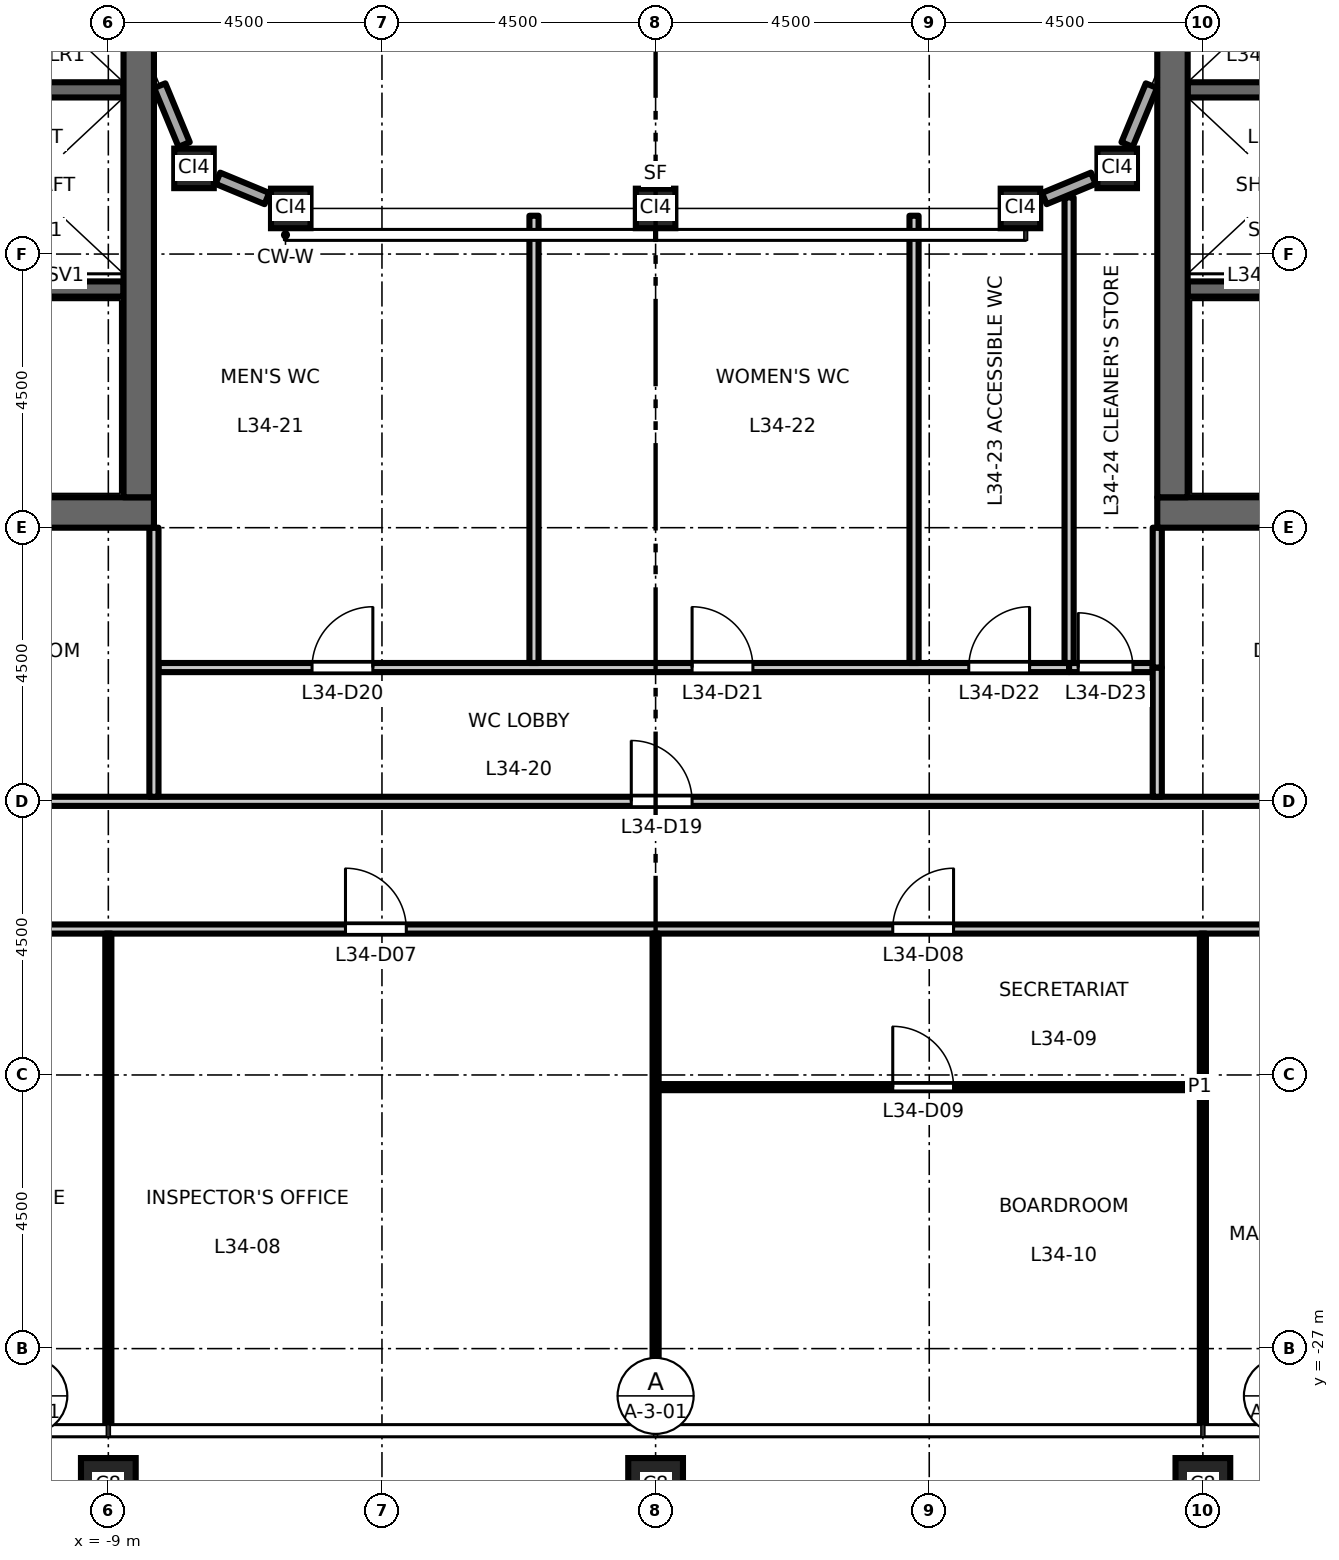
"""IFC4 building model, lengths in metres.
Left out: names, types, materials, properties, quantities, classifications, styles, units other than length and angle.
Written with IfcOpenShell. Run it as: python <this file> out.ifc"""

import sys

from ifc_helpers import new_model, si_unit, direction, frame, frame_2d, origin, origin_2d, place, context, subcontext, project, spatial, rectangle, hollow_rectangle, extrude, element, fill, save


model = new_model("IFC4")
c1 = context("Model", 3, precision=1e-05, world=origin(), true_north=direction((0.0, 1.0)))
c2 = subcontext(c1, "Body", "Model", "MODEL_VIEW")
j1 = project(units=[si_unit("LENGTHUNIT", "METRE"), si_unit("PLANEANGLEUNIT", "RADIAN")], contexts=[c1])
p1 = place(None, origin())
s1 = spatial("IfcSite", under=j1, at=p1, CompositionType="ELEMENT")
p2 = place(p1, origin())
s2 = spatial("IfcBuilding", under=s1, at=p2, CompositionType="ELEMENT")
p3 = place(p2, frame((0.0, 0.0, 158.7)))
s3 = spatial("IfcBuildingStorey", under=s2, at=p3, CompositionType="ELEMENT", Elevation=158.7)
for number, where, z_axis, x_axis in (
    (1, (-9.0, -29.25, 0.0), (0.0, 0.0, 1.0), (1.0, 0.0, 0.0)),
    (2, (0.0, -29.25, 0.0), (0.0, 0.0, 1.0), (1.0, 0.0, 0.0)),
    (3, (9.0, -29.25, 0.0), (0.0, 0.0, 1.0), (1.0, 0.0, 0.0)),
):
    element("IfcColumn", number, at=place(p3, frame(where, z_axis=z_axis, x_axis=x_axis)), inside=s3, PredefinedType="COLUMN", context=c2, shape_type="SweptSolid", body=[
        extrude(hollow_rectangle(XDim=0.9, YDim=0.9, WallThickness=0.05, at=origin_2d()), origin(), (0.0, 0.0, 1.0), 4.5),
    ])
for number, where, z_axis, x_axis in (
    (4, (-7.591, -7.591, 0.0), (0.0, 0.0, 1.0), (1.0, 0.0, 0.0)),
    (5, (-6.0, -8.25, 0.0), (0.0, 0.0, 1.0), (1.0, 0.0, 0.0)),
    (6, (0.0, -8.25, 0.0), (0.0, 0.0, 1.0), (1.0, 0.0, 0.0)),
    (7, (6.0, -8.25, 0.0), (0.0, 0.0, 1.0), (1.0, 0.0, 0.0)),
    (8, (7.591, -7.591, 0.0), (0.0, 0.0, 1.0), (1.0, 0.0, 0.0)),
):
    element("IfcColumn", number, at=place(p3, frame(where, z_axis=z_axis, x_axis=x_axis)), inside=s3, PredefinedType="COLUMN", context=c2, shape_type="SweptSolid", body=[
        extrude(hollow_rectangle(XDim=0.65, YDim=0.65, WallThickness=0.036, at=origin_2d()), origin(), (0.0, 0.0, 1.0), 4.5),
    ])
p4 = place(p3, frame((-8.75, -6.3, 0.0), z_axis=(0.0, 0.0, 1.0), x_axis=(-1.0, 0.0, 0.0)))
e9 = element("IfcWall", 9, at=p4, inside=s3, PredefinedType="SHEAR", context=c2, shape_type="SweptSolid", body=[
    extrude(rectangle(XDim=3.1, YDim=0.25, at=frame_2d((1.55, 0.0))), origin(), (0.0, 0.0, 1.0), 4.35),
])
p5 = place(p3, frame((-8.75, -9.575, 0.0), z_axis=(0.0, 0.0, 1.0), x_axis=(-1.0, 0.0, 0.0)))
e10 = element("IfcWall", 10, at=p5, inside=s3, PredefinedType="SHEAR", context=c2, shape_type="SweptSolid", body=[
    extrude(rectangle(XDim=8.0, YDim=0.25, at=frame_2d((4.0, 0.0))), origin(), (0.0, 0.0, 1.0), 4.35),
])
p6 = place(p5, frame((6.65, 0.0, 0.0)))
e11 = element("IfcOpeningElement", 11, at=p6, cuts=e10, PredefinedType="OPENING", context=c2, shape_type="SweptSolid", body=[
    extrude(rectangle(XDim=1.1, YDim=2.1, at=frame_2d((0.55, 1.05))), frame((0.0, 0.135, 0.0), z_axis=(0.0, -1.0, 0.0), x_axis=(1.0, 0.0, 0.0)), (0.0, 0.0, 1.0), 0.27),
])
p7 = place(p3, frame((-8.25, -13.25, 0.0), z_axis=(0.0, 0.0, 1.0), x_axis=(-1.0, 0.0, 0.0)))
e12 = element("IfcWall", 12, at=p7, inside=s3, PredefinedType="SHEAR", context=c2, shape_type="SweptSolid", body=[
    extrude(rectangle(XDim=13.5, YDim=0.5, at=frame_2d((6.75, 0.0))), origin(), (0.0, 0.0, 1.0), 4.35),
])
p8 = place(p3, frame((-8.5, -13.0, 0.0), z_axis=(0.0, 0.0, 1.0), x_axis=(0.0, 1.0, 0.0)))
e13 = element("IfcWall", 13, at=p8, inside=s3, PredefinedType="SHEAR", context=c2, shape_type="SweptSolid", body=[
    extrude(rectangle(XDim=26.0, YDim=0.5, at=frame_2d((13.0, 0.0))), origin(), (0.0, 0.0, 1.0), 4.35),
])
p9 = place(p3, frame((8.75, -6.3, 0.0), z_axis=(0.0, 0.0, 1.0), x_axis=(1.0, 0.0, 0.0)))
e14 = element("IfcWall", 14, at=p9, inside=s3, PredefinedType="SHEAR", context=c2, shape_type="SweptSolid", body=[
    extrude(rectangle(XDim=3.1, YDim=0.25, at=frame_2d((1.55, 0.0))), origin(), (0.0, 0.0, 1.0), 4.35),
])
p10 = place(p3, frame((8.75, -9.575, 0.0), z_axis=(0.0, 0.0, 1.0), x_axis=(1.0, 0.0, 0.0)))
e15 = element("IfcWall", 15, at=p10, inside=s3, PredefinedType="SHEAR", context=c2, shape_type="SweptSolid", body=[
    extrude(rectangle(XDim=8.0, YDim=0.25, at=frame_2d((4.0, 0.0))), origin(), (0.0, 0.0, 1.0), 4.35),
])
p11 = place(p10, frame((6.65, 0.0, 0.0)))
e16 = element("IfcOpeningElement", 16, at=p11, cuts=e15, PredefinedType="OPENING", context=c2, shape_type="SweptSolid", body=[
    extrude(rectangle(XDim=1.1, YDim=2.1, at=frame_2d((0.55, 1.05))), frame((0.0, 0.135, 0.0), z_axis=(0.0, -1.0, 0.0), x_axis=(1.0, 0.0, 0.0)), (0.0, 0.0, 1.0), 0.27),
])
p12 = place(p3, frame((8.25, -13.25, 0.0), z_axis=(0.0, 0.0, 1.0), x_axis=(1.0, 0.0, 0.0)))
e17 = element("IfcWall", 17, at=p12, inside=s3, PredefinedType="SHEAR", context=c2, shape_type="SweptSolid", body=[
    extrude(rectangle(XDim=13.5, YDim=0.5, at=frame_2d((6.75, 0.0))), origin(), (0.0, 0.0, 1.0), 4.35),
])
p13 = place(p3, frame((8.5, -13.0, 0.0), z_axis=(0.0, 0.0, 1.0), x_axis=(0.0, 1.0, 0.0)))
e18 = element("IfcWall", 18, at=p13, inside=s3, PredefinedType="SHEAR", context=c2, shape_type="SweptSolid", body=[
    extrude(rectangle(XDim=26.0, YDim=0.5, at=frame_2d((13.0, 0.0))), origin(), (0.0, 0.0, 1.0), 4.35),
])
p14 = place(p3, frame((6.392, -8.087, 0.0), z_axis=(0.0, 0.0, 1.0), x_axis=(0.923894108428, 0.382648241093, 0.0)))
e19 = element("IfcWall", 19, at=p14, inside=s3, PredefinedType="STANDARD", context=c2, shape_type="SweptSolid", body=[
    extrude(rectangle(XDim=0.873, YDim=0.2, at=frame_2d((0.437, 0.0))), origin(), (0.0, 0.0, 1.0), 3.826),
])
for number, where, z_axis, x_axis in (
    (20, (7.753, -7.199, 0.0), (0.0, 0.0, 1.0), (0.383, 0.924, 0.0)),
    (21, (-8.154, -6.231, 0.0), (0.0, 0.0, 1.0), (0.383, -0.924, 0.0)),
):
    element("IfcWall", number, at=place(p3, frame(where, z_axis=z_axis, x_axis=x_axis)), inside=s3, PredefinedType="STANDARD", context=c2, shape_type="SweptSolid", body=[
        extrude(rectangle(XDim=1.048, YDim=0.2, at=frame_2d((0.524, 0.0))), origin(), (0.0, 0.0, 1.0), 3.826),
    ])
p15 = place(p3, frame((-7.199, -7.753, 0.0), z_axis=(0.0, 0.0, 1.0), x_axis=(0.923894108428, -0.382648241093, 0.0)))
e22 = element("IfcWall", 22, at=p15, inside=s3, PredefinedType="STANDARD", context=c2, shape_type="SweptSolid", body=[
    extrude(rectangle(XDim=0.873, YDim=0.2, at=frame_2d((0.437, 0.0))), origin(), (0.0, 0.0, 1.0), 3.826),
])
p16 = place(p3, frame((0.05, -22.7, 0.0), z_axis=(0.0, 0.0, 1.0), x_axis=(1.0, 0.0, 0.0)))
e23 = element("IfcWall", 23, at=p16, inside=s3, PredefinedType="PARTITIONING", context=c2, shape_type="SweptSolid", body=[
    extrude(rectangle(XDim=8.9, YDim=0.1, at=frame_2d((4.45, 0.0))), origin(), (0.0, 0.0, 1.0), 4.35),
])
p17 = place(p16, frame((3.85, 0.0, 0.0)))
e24 = element("IfcOpeningElement", 24, at=p17, cuts=e23, PredefinedType="OPENING", context=c2, shape_type="SweptSolid", body=[
    extrude(rectangle(XDim=1.0, YDim=2.1, at=frame_2d((0.5, 1.05))), frame((0.0, 0.06, 0.0), z_axis=(0.0, -1.0, 0.0), x_axis=(1.0, 0.0, 0.0)), (0.0, 0.0, 1.0), 0.12),
])
p18 = place(p3, frame((-27.308, -20.1, 0.0), z_axis=(0.0, 0.0, 1.0), x_axis=(1.0, 0.0, 0.0)))
e25 = element("IfcWall", 25, at=p18, inside=s3, PredefinedType="PARTITIONING", context=c2, shape_type="SweptSolid", body=[
    extrude(rectangle(XDim=54.616, YDim=0.15, at=frame_2d((27.308, 0.0))), origin(), (0.0, 0.0, 1.0), 4.35),
])
p19 = place(p18, frame((13.208, 0.0, 0.0)))
e26 = element("IfcOpeningElement", 26, at=p19, cuts=e25, PredefinedType="OPENING", context=c2, shape_type="SweptSolid", body=[
    extrude(rectangle(XDim=1.0, YDim=2.1, at=frame_2d((0.5, 1.05))), frame((0.0, 0.085, 0.0), z_axis=(0.0, -1.0, 0.0), x_axis=(1.0, 0.0, 0.0)), (0.0, 0.0, 1.0), 0.17),
])
p20 = place(p18, frame((22.208, 0.0, 0.0)))
e27 = element("IfcOpeningElement", 27, at=p20, cuts=e25, PredefinedType="OPENING", context=c2, shape_type="SweptSolid", body=[
    extrude(rectangle(XDim=1.0, YDim=2.1, at=frame_2d((0.5, 1.05))), frame((0.0, 0.085, 0.0), z_axis=(0.0, -1.0, 0.0), x_axis=(1.0, 0.0, 0.0)), (0.0, 0.0, 1.0), 0.17),
])
p21 = place(p18, frame((31.208, 0.0, 0.0)))
e28 = element("IfcOpeningElement", 28, at=p21, cuts=e25, PredefinedType="OPENING", context=c2, shape_type="SweptSolid", body=[
    extrude(rectangle(XDim=1.0, YDim=2.1, at=frame_2d((0.5, 1.05))), frame((0.0, 0.085, 0.0), z_axis=(0.0, -1.0, 0.0), x_axis=(1.0, 0.0, 0.0)), (0.0, 0.0, 1.0), 0.17),
])
p22 = place(p18, frame((40.208, 0.0, 0.0)))
e29 = element("IfcOpeningElement", 29, at=p22, cuts=e25, PredefinedType="OPENING", context=c2, shape_type="SweptSolid", body=[
    extrude(rectangle(XDim=1.0, YDim=2.1, at=frame_2d((0.5, 1.05))), frame((0.0, 0.085, 0.0), z_axis=(0.0, -1.0, 0.0), x_axis=(1.0, 0.0, 0.0)), (0.0, 0.0, 1.0), 0.17),
])
p23 = place(p18, frame((4.15, 0.0, 0.0)))
e30 = element("IfcOpeningElement", 30, at=p23, cuts=e25, PredefinedType="OPENING", context=c2, shape_type="SweptSolid", body=[
    extrude(rectangle(XDim=1.0, YDim=2.1, at=frame_2d((0.5, 1.05))), frame((0.0, 0.085, 0.0), z_axis=(0.0, -1.0, 0.0), x_axis=(1.0, 0.0, 0.0)), (0.0, 0.0, 1.0), 0.17),
])
p24 = place(p18, frame((49.458, 0.0, 0.0)))
e31 = element("IfcOpeningElement", 31, at=p24, cuts=e25, PredefinedType="OPENING", context=c2, shape_type="SweptSolid", body=[
    extrude(rectangle(XDim=1.0, YDim=2.1, at=frame_2d((0.5, 1.05))), frame((0.0, 0.085, 0.0), z_axis=(0.0, -1.0, 0.0), x_axis=(1.0, 0.0, 0.0)), (0.0, 0.0, 1.0), 0.17),
])
p25 = place(p3, frame((-21.825, -18.0, 0.0), z_axis=(0.0, 0.0, 1.0), x_axis=(1.0, 0.0, 0.0)))
e32 = element("IfcWall", 32, at=p25, inside=s3, PredefinedType="PARTITIONING", context=c2, shape_type="SweptSolid", body=[
    extrude(rectangle(XDim=43.65, YDim=0.15, at=frame_2d((21.825, 0.0))), origin(), (0.0, 0.0, 1.0), 4.35),
])
p26 = place(p25, frame((21.425, 0.0, 0.0)))
e33 = element("IfcOpeningElement", 33, at=p26, cuts=e32, PredefinedType="OPENING", context=c2, shape_type="SweptSolid", body=[
    extrude(rectangle(XDim=1.0, YDim=2.1, at=frame_2d((0.5, 1.05))), frame((0.0, 0.085, 0.0), z_axis=(0.0, -1.0, 0.0), x_axis=(1.0, 0.0, 0.0)), (0.0, 0.0, 1.0), 0.17),
])
p27 = place(p25, frame((6.425, 0.0, 0.0)))
e34 = element("IfcOpeningElement", 34, at=p27, cuts=e32, PredefinedType="OPENING", context=c2, shape_type="SweptSolid", body=[
    extrude(rectangle(XDim=1.0, YDim=2.1, at=frame_2d((0.5, 1.05))), frame((0.0, 0.085, 0.0), z_axis=(0.0, -1.0, 0.0), x_axis=(1.0, 0.0, 0.0)), (0.0, 0.0, 1.0), 0.17),
])
p28 = place(p25, frame((36.425, 0.0, 0.0)))
e35 = element("IfcOpeningElement", 35, at=p28, cuts=e32, PredefinedType="OPENING", context=c2, shape_type="SweptSolid", body=[
    extrude(rectangle(XDim=1.0, YDim=2.1, at=frame_2d((0.5, 1.05))), frame((0.0, 0.085, 0.0), z_axis=(0.0, -1.0, 0.0), x_axis=(1.0, 0.0, 0.0)), (0.0, 0.0, 1.0), 0.17),
])
p29 = place(p3, frame((-8.175, -15.8, 0.0), z_axis=(0.0, 0.0, 1.0), x_axis=(1.0, 0.0, 0.0)))
e36 = element("IfcWall", 36, at=p29, inside=s3, PredefinedType="PARTITIONING", context=c2, shape_type="SweptSolid", body=[
    extrude(rectangle(XDim=14.975, YDim=0.15, at=frame_2d((7.488, 0.0))), origin(), (0.0, 0.0, 1.0), 4.35),
])
p30 = place(p29, frame((2.525, 0.0, 0.0)))
e37 = element("IfcOpeningElement", 37, at=p30, cuts=e36, PredefinedType="OPENING", context=c2, shape_type="SweptSolid", body=[
    extrude(rectangle(XDim=1.0, YDim=2.1, at=frame_2d((0.5, 1.05))), frame((0.0, 0.085, 0.0), z_axis=(0.0, -1.0, 0.0), x_axis=(1.0, 0.0, 0.0)), (0.0, 0.0, 1.0), 0.17),
])
p31 = place(p29, frame((8.775, 0.0, 0.0)))
e38 = element("IfcOpeningElement", 38, at=p31, cuts=e36, PredefinedType="OPENING", context=c2, shape_type="SweptSolid", body=[
    extrude(rectangle(XDim=1.0, YDim=2.1, at=frame_2d((0.5, 1.05))), frame((0.0, 0.085, 0.0), z_axis=(0.0, -1.0, 0.0), x_axis=(1.0, 0.0, 0.0)), (0.0, 0.0, 1.0), 0.17),
])
p32 = place(p29, frame((13.325, 0.0, 0.0)))
e39 = element("IfcOpeningElement", 39, at=p32, cuts=e36, PredefinedType="OPENING", context=c2, shape_type="SweptSolid", body=[
    extrude(rectangle(XDim=1.0, YDim=2.1, at=frame_2d((0.5, 1.05))), frame((0.0, 0.085, 0.0), z_axis=(0.0, -1.0, 0.0), x_axis=(1.0, 0.0, 0.0)), (0.0, 0.0, 1.0), 0.17),
])
p33 = place(p3, frame((6.8, -15.8, 0.0), z_axis=(0.0, 0.0, 1.0), x_axis=(1.0, 0.0, 0.0)))
e40 = element("IfcWall", 40, at=p33, inside=s3, PredefinedType="PARTITIONING", context=c2, shape_type="SweptSolid", body=[
    extrude(rectangle(XDim=1.375, YDim=0.15, at=frame_2d((0.688, 0.0))), origin(), (0.0, 0.0, 1.0), 4.35),
])
p34 = place(p33, frame((0.15, 0.0, 0.0)))
e41 = element("IfcOpeningElement", 41, at=p34, cuts=e40, PredefinedType="OPENING", context=c2, shape_type="SweptSolid", body=[
    extrude(rectangle(XDim=0.9, YDim=2.1, at=frame_2d((0.45, 1.05))), frame((0.0, 0.085, 0.0), z_axis=(0.0, -1.0, 0.0), x_axis=(1.0, 0.0, 0.0)), (0.0, 0.0, 1.0), 0.17),
])
p35 = place(p3, frame((-9.0, -28.26, 0.0), z_axis=(0.0, 0.0, 1.0), x_axis=(0.0, 1.0, 0.0)))
e42 = element("IfcWall", 42, at=p35, inside=s3, PredefinedType="PARTITIONING", context=c2, shape_type="SweptSolid", body=[
    extrude(rectangle(XDim=8.085, YDim=0.1, at=frame_2d((4.042, 0.0))), origin(), (0.0, 0.0, 1.0), 3.45),
])
p36 = place(p3, frame((-8.25, -17.925, 0.0), z_axis=(0.0, 0.0, 1.0), x_axis=(0.0, 1.0, 0.0)))
e43 = element("IfcWall", 43, at=p36, inside=s3, PredefinedType="PARTITIONING", context=c2, shape_type="SweptSolid", body=[
    extrude(rectangle(XDim=4.425, YDim=0.15, at=frame_2d((2.212, 0.0))), origin(), (0.0, 0.0, 1.0), 4.35),
])
p37 = place(p3, frame((-2.0, -15.725, 0.0), z_axis=(0.0, 0.0, 1.0), x_axis=(0.0, 1.0, 0.0)))
e44 = element("IfcWall", 44, at=p37, inside=s3, PredefinedType="PARTITIONING", context=c2, shape_type="SweptSolid", body=[
    extrude(rectangle(XDim=7.355, YDim=0.15, at=frame_2d((3.677, 0.0))), origin(), (0.0, 0.0, 1.0), 4.35),
])
p38 = place(p3, frame((0.0, -28.26, 0.0), z_axis=(0.0, 0.0, 1.0), x_axis=(0.0, 1.0, 0.0)))
e45 = element("IfcWall", 45, at=p38, inside=s3, PredefinedType="PARTITIONING", context=c2, shape_type="SweptSolid", body=[
    extrude(rectangle(XDim=8.085, YDim=0.1, at=frame_2d((4.042, 0.0))), origin(), (0.0, 0.0, 1.0), 3.45),
])
p39 = place(p3, frame((4.25, -15.725, 0.0), z_axis=(0.0, 0.0, 1.0), x_axis=(0.0, 1.0, 0.0)))
e46 = element("IfcWall", 46, at=p39, inside=s3, PredefinedType="PARTITIONING", context=c2, shape_type="SweptSolid", body=[
    extrude(rectangle(XDim=7.355, YDim=0.15, at=frame_2d((3.677, 0.0))), origin(), (0.0, 0.0, 1.0), 4.35),
])
p40 = place(p3, frame((6.8, -15.725, 0.0), z_axis=(0.0, 0.0, 1.0), x_axis=(0.0, 1.0, 0.0)))
e47 = element("IfcWall", 47, at=p40, inside=s3, PredefinedType="PARTITIONING", context=c2, shape_type="SweptSolid", body=[
    extrude(rectangle(XDim=7.656, YDim=0.15, at=frame_2d((3.828, 0.0))), origin(), (0.0, 0.0, 1.0), 4.35),
])
p41 = place(p3, frame((8.25, -17.925, 0.0), z_axis=(0.0, 0.0, 1.0), x_axis=(0.0, 1.0, 0.0)))
e48 = element("IfcWall", 48, at=p41, inside=s3, PredefinedType="PARTITIONING", context=c2, shape_type="SweptSolid", body=[
    extrude(rectangle(XDim=2.125, YDim=0.15, at=frame_2d((1.062, 0.0))), origin(), (0.0, 0.0, 1.0), 4.35),
])
p42 = place(p3, frame((8.25, -15.8, 0.0), z_axis=(0.0, 0.0, 1.0), x_axis=(0.0, 1.0, 0.0)))
e49 = element("IfcWall", 49, at=p42, inside=s3, PredefinedType="PARTITIONING", context=c2, shape_type="SweptSolid", body=[
    extrude(rectangle(XDim=2.3, YDim=0.15, at=frame_2d((1.15, 0.0))), origin(), (0.0, 0.0, 1.0), 4.35),
])
p43 = place(p3, frame((9.0, -28.26, 0.0), z_axis=(0.0, 0.0, 1.0), x_axis=(0.0, 1.0, 0.0)))
e50 = element("IfcWall", 50, at=p43, inside=s3, PredefinedType="PARTITIONING", context=c2, shape_type="SweptSolid", body=[
    extrude(rectangle(XDim=8.085, YDim=0.1, at=frame_2d((4.042, 0.0))), origin(), (0.0, 0.0, 1.0), 3.45),
])
p44 = place(p20, origin())
e51 = element("IfcDoor", 51, at=p44, inside=s3, OperationType="SINGLE_SWING_LEFT", PredefinedType="DOOR", context=c2, shape_type="SweptSolid", body=[
    extrude(rectangle(XDim=1.0, YDim=2.1, at=frame_2d((0.5, 1.05))), frame((0.0, 0.025, 0.0), z_axis=(0.0, -1.0, 0.0), x_axis=(1.0, 0.0, 0.0)), (0.0, 0.0, 1.0), 0.05),
])
fill(e27, e51)
p45 = place(p21, origin())
e52 = element("IfcDoor", 52, at=p45, inside=s3, OperationType="SINGLE_SWING_RIGHT", PredefinedType="DOOR", context=c2, shape_type="SweptSolid", body=[
    extrude(rectangle(XDim=1.0, YDim=2.1, at=frame_2d((0.5, 1.05))), frame((0.0, 0.025, 0.0), z_axis=(0.0, -1.0, 0.0), x_axis=(1.0, 0.0, 0.0)), (0.0, 0.0, 1.0), 0.05),
])
fill(e28, e52)
p46 = place(p17, origin())
e53 = element("IfcDoor", 53, at=p46, inside=s3, OperationType="SINGLE_SWING_LEFT", PredefinedType="DOOR", context=c2, shape_type="SweptSolid", body=[
    extrude(rectangle(XDim=1.0, YDim=2.1, at=frame_2d((0.5, 1.05))), frame((0.0, 0.025, 0.0), z_axis=(0.0, -1.0, 0.0), x_axis=(1.0, 0.0, 0.0)), (0.0, 0.0, 1.0), 0.05),
])
fill(e24, e53)
p47 = place(p26, origin())
e54 = element("IfcDoor", 54, at=p47, inside=s3, OperationType="SINGLE_SWING_LEFT", PredefinedType="DOOR", context=c2, shape_type="SweptSolid", body=[
    extrude(rectangle(XDim=1.0, YDim=2.1, at=frame_2d((0.5, 1.05))), frame((0.0, 0.025, 0.0), z_axis=(0.0, -1.0, 0.0), x_axis=(1.0, 0.0, 0.0)), (0.0, 0.0, 1.0), 0.05),
])
fill(e33, e54)
p48 = place(p30, origin())
e55 = element("IfcDoor", 55, at=p48, inside=s3, OperationType="SINGLE_SWING_RIGHT", PredefinedType="DOOR", context=c2, shape_type="SweptSolid", body=[
    extrude(rectangle(XDim=1.0, YDim=2.1, at=frame_2d((0.5, 1.05))), frame((0.0, 0.025, 0.0), z_axis=(0.0, -1.0, 0.0), x_axis=(1.0, 0.0, 0.0)), (0.0, 0.0, 1.0), 0.05),
])
fill(e37, e55)
p49 = place(p31, origin())
e56 = element("IfcDoor", 56, at=p49, inside=s3, OperationType="SINGLE_SWING_LEFT", PredefinedType="DOOR", context=c2, shape_type="SweptSolid", body=[
    extrude(rectangle(XDim=1.0, YDim=2.1, at=frame_2d((0.5, 1.05))), frame((0.0, 0.025, 0.0), z_axis=(0.0, -1.0, 0.0), x_axis=(1.0, 0.0, 0.0)), (0.0, 0.0, 1.0), 0.05),
])
fill(e38, e56)
p50 = place(p32, origin())
e57 = element("IfcDoor", 57, at=p50, inside=s3, OperationType="SINGLE_SWING_RIGHT", PredefinedType="DOOR", context=c2, shape_type="SweptSolid", body=[
    extrude(rectangle(XDim=1.0, YDim=2.1, at=frame_2d((0.5, 1.05))), frame((0.0, 0.025, 0.0), z_axis=(0.0, -1.0, 0.0), x_axis=(1.0, 0.0, 0.0)), (0.0, 0.0, 1.0), 0.05),
])
fill(e39, e57)
p51 = place(p34, origin())
e58 = element("IfcDoor", 58, at=p51, inside=s3, OperationType="SINGLE_SWING_LEFT", PredefinedType="DOOR", context=c2, shape_type="SweptSolid", body=[
    extrude(rectangle(XDim=0.9, YDim=2.1, at=frame_2d((0.45, 1.05))), frame((0.0, 0.025, 0.0), z_axis=(0.0, -1.0, 0.0), x_axis=(1.0, 0.0, 0.0)), (0.0, 0.0, 1.0), 0.05),
])
fill(e41, e58)
save(model, sys.argv[1])
